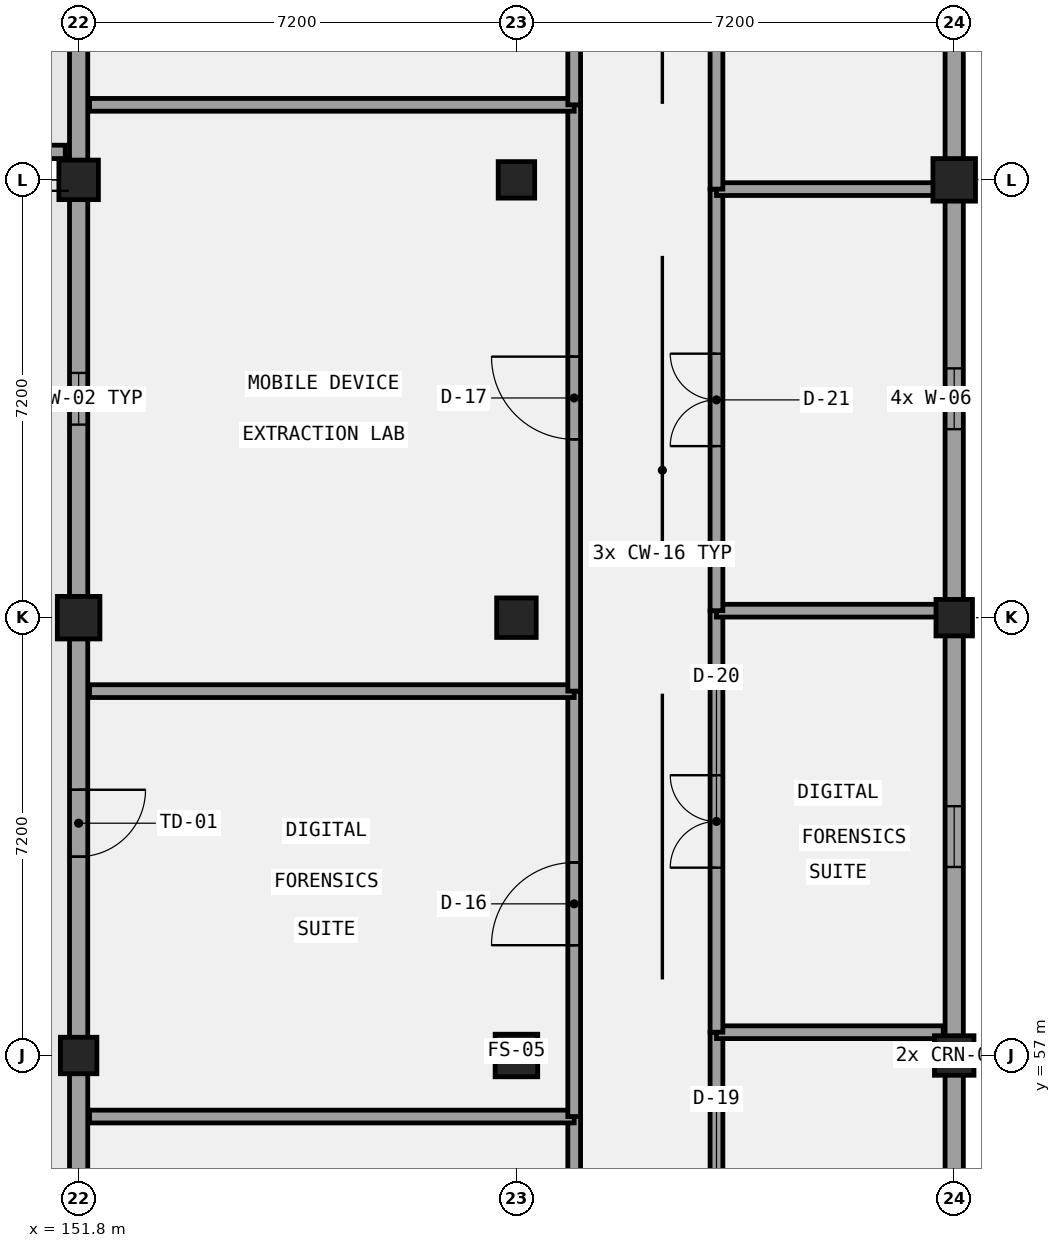
"""IFC4 building model, lengths in metres.
Left out: names, types, materials, properties, quantities, classifications, styles, units other than length and angle.
Written with IfcOpenShell. Run it as: python <this file> out.ifc"""

import sys

from ifc_helpers import new_model, si_unit, direction, frame, frame_2d, origin, origin_2d, place, context, subcontext, project, spatial, rectangle, extrude, element, fill, save


model = new_model("IFC4")
c1 = context("Model", 3, precision=1e-05, world=origin(), true_north=direction((0.0, 1.0)))
c2 = subcontext(c1, "Body", "Model", "MODEL_VIEW")
j1 = project(units=[si_unit("LENGTHUNIT", "METRE"), si_unit("PLANEANGLEUNIT", "RADIAN")], contexts=[c1])
p1 = place(None, origin())
s1 = spatial("IfcSite", under=j1, at=p1, CompositionType="ELEMENT")
p2 = place(p1, origin())
s2 = spatial("IfcBuilding", under=s1, at=p2, CompositionType="ELEMENT")
p3 = place(p2, frame((0.0, 0.0, 13.8)))
s3 = spatial("IfcBuildingStorey", under=s2, at=p3, CompositionType="ELEMENT", Elevation=13.8)
p4 = place(p3, frame((151.8, 57.0, 0.0), z_axis=(0.0, 0.0, 1.0), x_axis=(1.0, 0.0, 0.0)))
e1 = element("IfcColumn", 1, at=p4, inside=s3, PredefinedType="COLUMN", context=c2, shape_type="SweptSolid", body=[
    extrude(rectangle(XDim=0.6, YDim=0.6, at=origin_2d()), origin(), (0.0, 0.0, 1.0), 4.2),
])
p5 = place(p3, frame((151.8, 64.2, 0.0), z_axis=(0.0, 0.0, 1.0), x_axis=(1.0, 0.0, 0.0)))
e2 = element("IfcColumn", 2, at=p5, inside=s3, PredefinedType="COLUMN", context=c2, shape_type="SweptSolid", body=[
    extrude(rectangle(XDim=0.7, YDim=0.7, at=origin_2d()), origin(), (0.0, 0.0, 1.0), 4.2),
])
p6 = place(p3, frame((151.8, 71.4, 0.0), z_axis=(0.0, 0.0, 1.0), x_axis=(1.0, 0.0, 0.0)))
e3 = element("IfcColumn", 3, at=p6, inside=s3, PredefinedType="COLUMN", context=c2, shape_type="SweptSolid", body=[
    extrude(rectangle(XDim=0.65, YDim=0.65, at=origin_2d()), origin(), (0.0, 0.0, 1.0), 4.2),
])
p7 = place(p3, frame((159.0, 57.0, 0.0), z_axis=(0.0, 0.0, 1.0), x_axis=(1.0, 0.0, 0.0)))
e4 = element("IfcColumn", 4, at=p7, inside=s3, PredefinedType="COLUMN", context=c2, shape_type="SweptSolid", body=[
    extrude(rectangle(XDim=0.7, YDim=0.7, at=origin_2d()), origin(), (0.0, 0.0, 1.0), 4.2),
])
p8 = place(p3, frame((159.0, 64.2, 0.0), z_axis=(0.0, 0.0, 1.0), x_axis=(1.0, 0.0, 0.0)))
e5 = element("IfcColumn", 5, at=p8, inside=s3, PredefinedType="COLUMN", context=c2, shape_type="SweptSolid", body=[
    extrude(rectangle(XDim=0.65, YDim=0.65, at=origin_2d()), origin(), (0.0, 0.0, 1.0), 4.2),
])
p9 = place(p3, frame((159.0, 71.4, 0.0), z_axis=(0.0, 0.0, 1.0), x_axis=(1.0, 0.0, 0.0)))
e6 = element("IfcColumn", 6, at=p9, inside=s3, PredefinedType="COLUMN", context=c2, shape_type="SweptSolid", body=[
    extrude(rectangle(XDim=0.6, YDim=0.6, at=origin_2d()), origin(), (0.0, 0.0, 1.0), 4.2),
])
p10 = place(p3, frame((166.2, 57.0, 0.0), z_axis=(0.0, 0.0, 1.0), x_axis=(1.0, 0.0, 0.0)))
e7 = element("IfcColumn", 7, at=p10, inside=s3, PredefinedType="COLUMN", context=c2, shape_type="SweptSolid", body=[
    extrude(rectangle(XDim=0.65, YDim=0.65, at=origin_2d()), origin(), (0.0, 0.0, 1.0), 4.2),
])
p11 = place(p3, frame((166.2, 64.2, 0.0), z_axis=(0.0, 0.0, 1.0), x_axis=(1.0, 0.0, 0.0)))
e8 = element("IfcColumn", 8, at=p11, inside=s3, PredefinedType="COLUMN", context=c2, shape_type="SweptSolid", body=[
    extrude(rectangle(XDim=0.6, YDim=0.6, at=origin_2d()), origin(), (0.0, 0.0, 1.0), 4.2),
])
p12 = place(p3, frame((166.2, 71.4, 0.0), z_axis=(0.0, 0.0, 1.0), x_axis=(1.0, 0.0, 0.0)))
e9 = element("IfcColumn", 9, at=p12, inside=s3, PredefinedType="COLUMN", context=c2, shape_type="SweptSolid", body=[
    extrude(rectangle(XDim=0.7, YDim=0.7, at=origin_2d()), origin(), (0.0, 0.0, 1.0), 4.2),
])
p13 = place(p3, frame((151.8, 78.45, 0.0), z_axis=(0.0, 0.0, 1.0), x_axis=(0.0, -1.0, 0.0)))
e10 = element("IfcWall", 10, at=p13, inside=s3, PredefinedType="SOLIDWALL", context=c2, shape_type="SweptSolid", body=[
    extrude(rectangle(XDim=28.46, YDim=0.3, at=frame_2d((14.23, 0.0))), origin(), (0.0, 0.0, 1.0), 3.19),
])
p14 = place(p13, frame((17.08, 0.0, 0.0)))
e11 = element("IfcOpeningElement", 11, at=p14, cuts=e10, PredefinedType="OPENING", context=c2, shape_type="SweptSolid", body=[
    extrude(rectangle(XDim=1.1, YDim=2.2, at=frame_2d((0.55, 1.1))), frame((0.0, 0.16, 0.0), z_axis=(0.0, -1.0, 0.0), x_axis=(1.0, 0.0, 0.0)), (0.0, 0.0, 1.0), 0.32),
])
p15 = place(p13, frame((24.53, 0.0, 1.0)))
e12 = element("IfcOpeningElement", 12, at=p15, cuts=e10, PredefinedType="OPENING", context=c2, shape_type="SweptSolid", body=[
    extrude(rectangle(XDim=0.85, YDim=1.65, at=frame_2d((0.425, 0.825))), frame((0.0, 0.16, 0.0), z_axis=(0.0, -1.0, 0.0), x_axis=(1.0, 0.0, 0.0)), (0.0, 0.0, 1.0), 0.32),
])
p16 = place(p13, frame((10.225, 0.0, 1.0)))
e13 = element("IfcOpeningElement", 13, at=p16, cuts=e10, PredefinedType="OPENING", context=c2, shape_type="SweptSolid", body=[
    extrude(rectangle(XDim=0.85, YDim=1.65, at=frame_2d((0.425, 0.825))), frame((0.0, 0.16, 0.0), z_axis=(0.0, -1.0, 0.0), x_axis=(1.0, 0.0, 0.0)), (0.0, 0.0, 1.0), 0.32),
])
p17 = place(p13, frame((3.1, 0.0, 1.0)))
e14 = element("IfcOpeningElement", 14, at=p17, cuts=e10, PredefinedType="OPENING", context=c2, shape_type="SweptSolid", body=[
    extrude(rectangle(XDim=0.85, YDim=1.65, at=frame_2d((0.425, 0.825))), frame((0.0, 0.16, 0.0), z_axis=(0.0, -1.0, 0.0), x_axis=(1.0, 0.0, 0.0)), (0.0, 0.0, 1.0), 0.32),
])
p18 = place(p3, frame((166.2, 49.99, 0.0), z_axis=(0.0, 0.0, 1.0), x_axis=(0.0, 1.0, 0.0)))
e15 = element("IfcWall", 15, at=p18, inside=s3, PredefinedType="SOLIDWALL", context=c2, shape_type="SweptSolid", body=[
    extrude(rectangle(XDim=28.46, YDim=0.3, at=frame_2d((14.23, 0.0))), origin(), (0.0, 0.0, 1.0), 3.14),
])
p19 = place(p18, frame((3.005, 0.0, 1.0)))
e16 = element("IfcOpeningElement", 16, at=p19, cuts=e15, PredefinedType="OPENING", context=c2, shape_type="SweptSolid", body=[
    extrude(rectangle(XDim=1.0, YDim=1.4, at=frame_2d((0.5, 0.7))), frame((0.0, 0.16, 0.0), z_axis=(0.0, -1.0, 0.0), x_axis=(1.0, 0.0, 0.0)), (0.0, 0.0, 1.0), 0.32),
])
p20 = place(p18, frame((10.11, 0.0, 1.0)))
e17 = element("IfcOpeningElement", 17, at=p20, cuts=e15, PredefinedType="OPENING", context=c2, shape_type="SweptSolid", body=[
    extrude(rectangle(XDim=1.0, YDim=1.4, at=frame_2d((0.5, 0.7))), frame((0.0, 0.16, 0.0), z_axis=(0.0, -1.0, 0.0), x_axis=(1.0, 0.0, 0.0)), (0.0, 0.0, 1.0), 0.32),
])
p21 = place(p18, frame((17.31, 0.0, 1.0)))
e18 = element("IfcOpeningElement", 18, at=p21, cuts=e15, PredefinedType="OPENING", context=c2, shape_type="SweptSolid", body=[
    extrude(rectangle(XDim=1.0, YDim=1.4, at=frame_2d((0.5, 0.7))), frame((0.0, 0.16, 0.0), z_axis=(0.0, -1.0, 0.0), x_axis=(1.0, 0.0, 0.0)), (0.0, 0.0, 1.0), 0.32),
])
p22 = place(p18, frame((24.435, 0.0, 1.0)))
e19 = element("IfcOpeningElement", 19, at=p22, cuts=e15, PredefinedType="OPENING", context=c2, shape_type="SweptSolid", body=[
    extrude(rectangle(XDim=1.0, YDim=1.4, at=frame_2d((0.5, 0.7))), frame((0.0, 0.16, 0.0), z_axis=(0.0, -1.0, 0.0), x_axis=(1.0, 0.0, 0.0)), (0.0, 0.0, 1.0), 0.32),
])
p23 = place(p3, frame((151.58, 71.86, 0.0), z_axis=(0.0, 0.0, 1.0), x_axis=(-1.0, 0.0, 0.0)))
e20 = element("IfcWall", 20, at=p23, inside=s3, PredefinedType="PARAPET", context=c2, shape_type="SweptSolid", body=[
    extrude(rectangle(XDim=2.58, YDim=0.22, at=frame_2d((1.29, 0.0))), origin(), (0.0, 0.0, 1.0), 1.12),
])
p24 = place(p3, frame((159.95, 50.45, 0.0), z_axis=(0.0, 0.0, 1.0), x_axis=(0.0, 1.0, 0.0)))
e21 = element("IfcWall", 21, at=p24, inside=s3, PredefinedType="PARTITIONING", context=c2, shape_type="SweptSolid", body=[
    extrude(rectangle(XDim=5.546, YDim=0.21, at=frame_2d((2.773, 0.0))), origin(), (0.0, 0.0, 1.0), 3.94),
])
p25 = place(p24, frame((2.163, 0.0, 0.0)))
e22 = element("IfcOpeningElement", 22, at=p25, cuts=e21, PredefinedType="OPENING", context=c2, shape_type="SweptSolid", body=[
    extrude(rectangle(XDim=1.22, YDim=2.35, at=frame_2d((0.61, 1.175))), frame((0.0, 0.115, 0.0), z_axis=(0.0, -1.0, 0.0), x_axis=(1.0, 0.0, 0.0)), (0.0, 0.0, 1.0), 0.23),
])
p26 = place(p3, frame((151.98, 55.996, 0.0), z_axis=(0.0, 0.0, 1.0), x_axis=(1.0, 0.0, 0.0)))
e23 = element("IfcWall", 23, at=p26, inside=s3, PredefinedType="PARTITIONING", context=c2, shape_type="SweptSolid", body=[
    extrude(rectangle(XDim=7.97, YDim=0.21, at=frame_2d((3.985, 0.0))), origin(), (0.0, 0.0, 1.0), 3.94),
])
p27 = place(p3, frame((159.95, 55.996, 0.0), z_axis=(0.0, 0.0, 1.0), x_axis=(0.0, 1.0, 0.0)))
e24 = element("IfcWall", 24, at=p27, inside=s3, PredefinedType="PARTITIONING", context=c2, shape_type="SweptSolid", body=[
    extrude(rectangle(XDim=6.996, YDim=0.21, at=frame_2d((3.498, 0.0))), origin(), (0.0, 0.0, 1.0), 3.94),
])
p28 = place(p27, frame((2.818, 0.0, 0.0)))
e25 = element("IfcOpeningElement", 25, at=p28, cuts=e24, PredefinedType="OPENING", context=c2, shape_type="SweptSolid", body=[
    extrude(rectangle(XDim=1.36, YDim=2.1, at=frame_2d((0.68, 1.05))), frame((0.0, 0.115, 0.0), z_axis=(0.0, -1.0, 0.0), x_axis=(1.0, 0.0, 0.0)), (0.0, 0.0, 1.0), 0.23),
])
p29 = place(p3, frame((151.98, 62.992, 0.0), z_axis=(0.0, 0.0, 1.0), x_axis=(1.0, 0.0, 0.0)))
e26 = element("IfcWall", 26, at=p29, inside=s3, PredefinedType="PARTITIONING", context=c2, shape_type="SweptSolid", body=[
    extrude(rectangle(XDim=7.97, YDim=0.21, at=frame_2d((3.985, 0.0))), origin(), (0.0, 0.0, 1.0), 3.94),
])
p30 = place(p3, frame((159.95, 62.992, 0.0), z_axis=(0.0, 0.0, 1.0), x_axis=(0.0, 1.0, 0.0)))
e27 = element("IfcWall", 27, at=p30, inside=s3, PredefinedType="PARTITIONING", context=c2, shape_type="SweptSolid", body=[
    extrude(rectangle(XDim=9.642, YDim=0.21, at=frame_2d((4.821, 0.0))), origin(), (0.0, 0.0, 1.0), 3.94),
])
p31 = place(p30, frame((4.141, 0.0, 0.0)))
e28 = element("IfcOpeningElement", 28, at=p31, cuts=e27, PredefinedType="OPENING", context=c2, shape_type="SweptSolid", body=[
    extrude(rectangle(XDim=1.36, YDim=2.22, at=frame_2d((0.68, 1.11))), frame((0.0, 0.115, 0.0), z_axis=(0.0, -1.0, 0.0), x_axis=(1.0, 0.0, 0.0)), (0.0, 0.0, 1.0), 0.23),
])
p32 = place(p3, frame((151.98, 72.634, 0.0), z_axis=(0.0, 0.0, 1.0), x_axis=(1.0, 0.0, 0.0)))
e29 = element("IfcWall", 29, at=p32, inside=s3, PredefinedType="PARTITIONING", context=c2, shape_type="SweptSolid", body=[
    extrude(rectangle(XDim=7.97, YDim=0.21, at=frame_2d((3.985, 0.0))), origin(), (0.0, 0.0, 1.0), 3.94),
])
p33 = place(p3, frame((159.95, 72.634, 0.0), z_axis=(0.0, 0.0, 1.0), x_axis=(0.0, 1.0, 0.0)))
e30 = element("IfcWall", 30, at=p33, inside=s3, PredefinedType="PARTITIONING", context=c2, shape_type="SweptSolid", body=[
    extrude(rectangle(XDim=5.546, YDim=0.21, at=frame_2d((2.773, 0.0))), origin(), (0.0, 0.0, 1.0), 3.94),
])
p34 = place(p33, frame((2.093, 0.0, 0.0)))
e31 = element("IfcOpeningElement", 31, at=p34, cuts=e30, PredefinedType="OPENING", context=c2, shape_type="SweptSolid", body=[
    extrude(rectangle(XDim=1.36, YDim=2.35, at=frame_2d((0.68, 1.175))), frame((0.0, 0.115, 0.0), z_axis=(0.0, -1.0, 0.0), x_axis=(1.0, 0.0, 0.0)), (0.0, 0.0, 1.0), 0.23),
])
p35 = place(p3, frame((162.29, 50.45, 0.0), z_axis=(0.0, 0.0, 1.0), x_axis=(0.0, 1.0, 0.0)))
e32 = element("IfcWall", 32, at=p35, inside=s3, PredefinedType="PARTITIONING", context=c2, shape_type="SweptSolid", body=[
    extrude(rectangle(XDim=6.933, YDim=0.21, at=frame_2d((3.467, 0.0))), origin(), (0.0, 0.0, 1.0), 3.94),
])
p36 = place(p35, frame((2.707, 0.0, 0.0)))
e33 = element("IfcOpeningElement", 33, at=p36, cuts=e32, PredefinedType="OPENING", context=c2, shape_type="SweptSolid", body=[
    extrude(rectangle(XDim=1.52, YDim=2.1, at=frame_2d((0.76, 1.05))), frame((0.0, 0.115, 0.0), z_axis=(0.0, -1.0, 0.0), x_axis=(1.0, 0.0, 0.0)), (0.0, 0.0, 1.0), 0.23),
])
p37 = place(p3, frame((162.29, 57.383, 0.0), z_axis=(0.0, 0.0, 1.0), x_axis=(1.0, 0.0, 0.0)))
e34 = element("IfcWall", 34, at=p37, inside=s3, PredefinedType="PARTITIONING", context=c2, shape_type="SweptSolid", body=[
    extrude(rectangle(XDim=3.73, YDim=0.21, at=frame_2d((1.865, 0.0))), origin(), (0.0, 0.0, 1.0), 2.94),
])
p38 = place(p3, frame((162.29, 57.383, 0.0), z_axis=(0.0, 0.0, 1.0), x_axis=(0.0, 1.0, 0.0)))
e35 = element("IfcWall", 35, at=p38, inside=s3, PredefinedType="PARTITIONING", context=c2, shape_type="SweptSolid", body=[
    extrude(rectangle(XDim=6.932, YDim=0.21, at=frame_2d((3.466, 0.0))), origin(), (0.0, 0.0, 1.0), 3.94),
])
p39 = place(p38, frame((2.706, 0.0, 0.0)))
e36 = element("IfcOpeningElement", 36, at=p39, cuts=e35, PredefinedType="OPENING", context=c2, shape_type="SweptSolid", body=[
    extrude(rectangle(XDim=1.52, YDim=2.22, at=frame_2d((0.76, 1.11))), frame((0.0, 0.115, 0.0), z_axis=(0.0, -1.0, 0.0), x_axis=(1.0, 0.0, 0.0)), (0.0, 0.0, 1.0), 0.23),
])
p40 = place(p3, frame((162.29, 64.315, 0.0), z_axis=(0.0, 0.0, 1.0), x_axis=(1.0, 0.0, 0.0)))
e37 = element("IfcWall", 37, at=p40, inside=s3, PredefinedType="PARTITIONING", context=c2, shape_type="SweptSolid", body=[
    extrude(rectangle(XDim=3.73, YDim=0.21, at=frame_2d((1.865, 0.0))), origin(), (0.0, 0.0, 1.0), 3.39),
])
p41 = place(p3, frame((162.29, 64.315, 0.0), z_axis=(0.0, 0.0, 1.0), x_axis=(0.0, 1.0, 0.0)))
e38 = element("IfcWall", 38, at=p41, inside=s3, PredefinedType="PARTITIONING", context=c2, shape_type="SweptSolid", body=[
    extrude(rectangle(XDim=6.933, YDim=0.21, at=frame_2d((3.467, 0.0))), origin(), (0.0, 0.0, 1.0), 3.94),
])
p42 = place(p41, frame((2.707, 0.0, 0.0)))
e39 = element("IfcOpeningElement", 39, at=p42, cuts=e38, PredefinedType="OPENING", context=c2, shape_type="SweptSolid", body=[
    extrude(rectangle(XDim=1.52, YDim=2.35, at=frame_2d((0.76, 1.175))), frame((0.0, 0.115, 0.0), z_axis=(0.0, -1.0, 0.0), x_axis=(1.0, 0.0, 0.0)), (0.0, 0.0, 1.0), 0.23),
])
p43 = place(p3, frame((162.29, 71.248, 0.0), z_axis=(0.0, 0.0, 1.0), x_axis=(1.0, 0.0, 0.0)))
e40 = element("IfcWall", 40, at=p43, inside=s3, PredefinedType="PARTITIONING", context=c2, shape_type="SweptSolid", body=[
    extrude(rectangle(XDim=3.73, YDim=0.21, at=frame_2d((1.865, 0.0))), origin(), (0.0, 0.0, 1.0), 3.34),
])
p44 = place(p3, frame((162.29, 71.248, 0.0), z_axis=(0.0, 0.0, 1.0), x_axis=(0.0, 1.0, 0.0)))
e41 = element("IfcWall", 41, at=p44, inside=s3, PredefinedType="PARTITIONING", context=c2, shape_type="SweptSolid", body=[
    extrude(rectangle(XDim=6.932, YDim=0.21, at=frame_2d((3.466, 0.0))), origin(), (0.0, 0.0, 1.0), 3.94),
])
p45 = place(p44, frame((2.606, 0.0, 0.0)))
e42 = element("IfcOpeningElement", 42, at=p45, cuts=e41, PredefinedType="OPENING", context=c2, shape_type="SweptSolid", body=[
    extrude(rectangle(XDim=1.72, YDim=2.1, at=frame_2d((0.86, 1.05))), frame((0.0, 0.115, 0.0), z_axis=(0.0, -1.0, 0.0), x_axis=(1.0, 0.0, 0.0)), (0.0, 0.0, 1.0), 0.23),
])
p46 = place(p14, frame((1.1, 0.0, 0.0), z_axis=(0.0, 0.0, 1.0), x_axis=(-1.0, 0.0, 0.0)))
e43 = element("IfcDoor", 43, at=p46, inside=s3, OperationType="SINGLE_SWING_LEFT", PredefinedType="DOOR", context=c2, shape_type="SweptSolid", body=[
    extrude(rectangle(XDim=1.1, YDim=2.2, at=frame_2d((0.55, 1.1))), frame((0.0, 0.025, 0.0), z_axis=(0.0, -1.0, 0.0), x_axis=(1.0, 0.0, 0.0)), (0.0, 0.0, 1.0), 0.05),
])
fill(e11, e43)
p47 = place(p16, origin())
e44 = element("IfcWindow", 44, at=p47, inside=s3, PartitioningType="SINGLE_PANEL", PredefinedType="WINDOW", context=c2, shape_type="SweptSolid", body=[
    extrude(rectangle(XDim=0.85, YDim=1.65, at=frame_2d((0.425, 0.825))), frame((0.0, 0.03, 0.0), z_axis=(0.0, -1.0, 0.0), x_axis=(1.0, 0.0, 0.0)), (0.0, 0.0, 1.0), 0.06),
])
fill(e13, e44)
p48 = place(p20, origin())
e45 = element("IfcWindow", 45, at=p48, inside=s3, PartitioningType="SINGLE_PANEL", PredefinedType="WINDOW", context=c2, shape_type="SweptSolid", body=[
    extrude(rectangle(XDim=1.0, YDim=1.4, at=frame_2d((0.5, 0.7))), frame((0.0, 0.03, 0.0), z_axis=(0.0, -1.0, 0.0), x_axis=(1.0, 0.0, 0.0)), (0.0, 0.0, 1.0), 0.06),
])
fill(e17, e45)
p49 = place(p21, origin())
e46 = element("IfcWindow", 46, at=p49, inside=s3, PartitioningType="SINGLE_PANEL", PredefinedType="WINDOW", context=c2, shape_type="SweptSolid", body=[
    extrude(rectangle(XDim=1.0, YDim=1.4, at=frame_2d((0.5, 0.7))), frame((0.0, 0.03, 0.0), z_axis=(0.0, -1.0, 0.0), x_axis=(1.0, 0.0, 0.0)), (0.0, 0.0, 1.0), 0.06),
])
fill(e18, e46)
p50 = place(p28, frame((1.36, 0.0, 0.0), z_axis=(0.0, 0.0, 1.0), x_axis=(-1.0, 0.0, 0.0)))
e47 = element("IfcDoor", 47, at=p50, inside=s3, OperationType="SINGLE_SWING_LEFT", PredefinedType="DOOR", context=c2, shape_type="SweptSolid", body=[
    extrude(rectangle(XDim=1.36, YDim=2.1, at=frame_2d((0.68, 1.05))), frame((0.0, 0.025, 0.0), z_axis=(0.0, -1.0, 0.0), x_axis=(1.0, 0.0, 0.0)), (0.0, 0.0, 1.0), 0.05),
])
fill(e25, e47)
p51 = place(p31, frame((1.36, 0.0, 0.0), z_axis=(0.0, 0.0, 1.0), x_axis=(-1.0, 0.0, 0.0)))
e48 = element("IfcDoor", 48, at=p51, inside=s3, OperationType="SINGLE_SWING_RIGHT", PredefinedType="DOOR", context=c2, shape_type="SweptSolid", body=[
    extrude(rectangle(XDim=1.36, YDim=2.22, at=frame_2d((0.68, 1.11))), frame((0.0, 0.025, 0.0), z_axis=(0.0, -1.0, 0.0), x_axis=(1.0, 0.0, 0.0)), (0.0, 0.0, 1.0), 0.05),
])
fill(e28, e48)
p52 = place(p39, origin())
e49 = element("IfcDoor", 49, at=p52, inside=s3, OperationType="DOUBLE_DOOR_SINGLE_SWING", PredefinedType="DOOR", context=c2, shape_type="SweptSolid", body=[
    extrude(rectangle(XDim=1.52, YDim=2.22, at=frame_2d((0.76, 1.11))), frame((0.0, 0.025, 0.0), z_axis=(0.0, -1.0, 0.0), x_axis=(1.0, 0.0, 0.0)), (0.0, 0.0, 1.0), 0.05),
])
fill(e36, e49)
p53 = place(p42, origin())
e50 = element("IfcDoor", 50, at=p53, inside=s3, OperationType="DOUBLE_DOOR_SINGLE_SWING", PredefinedType="DOOR", context=c2, shape_type="SweptSolid", body=[
    extrude(rectangle(XDim=1.52, YDim=2.35, at=frame_2d((0.76, 1.175))), frame((0.0, 0.025, 0.0), z_axis=(0.0, -1.0, 0.0), x_axis=(1.0, 0.0, 0.0)), (0.0, 0.0, 1.0), 0.05),
])
fill(e39, e50)
save(model, sys.argv[1])
